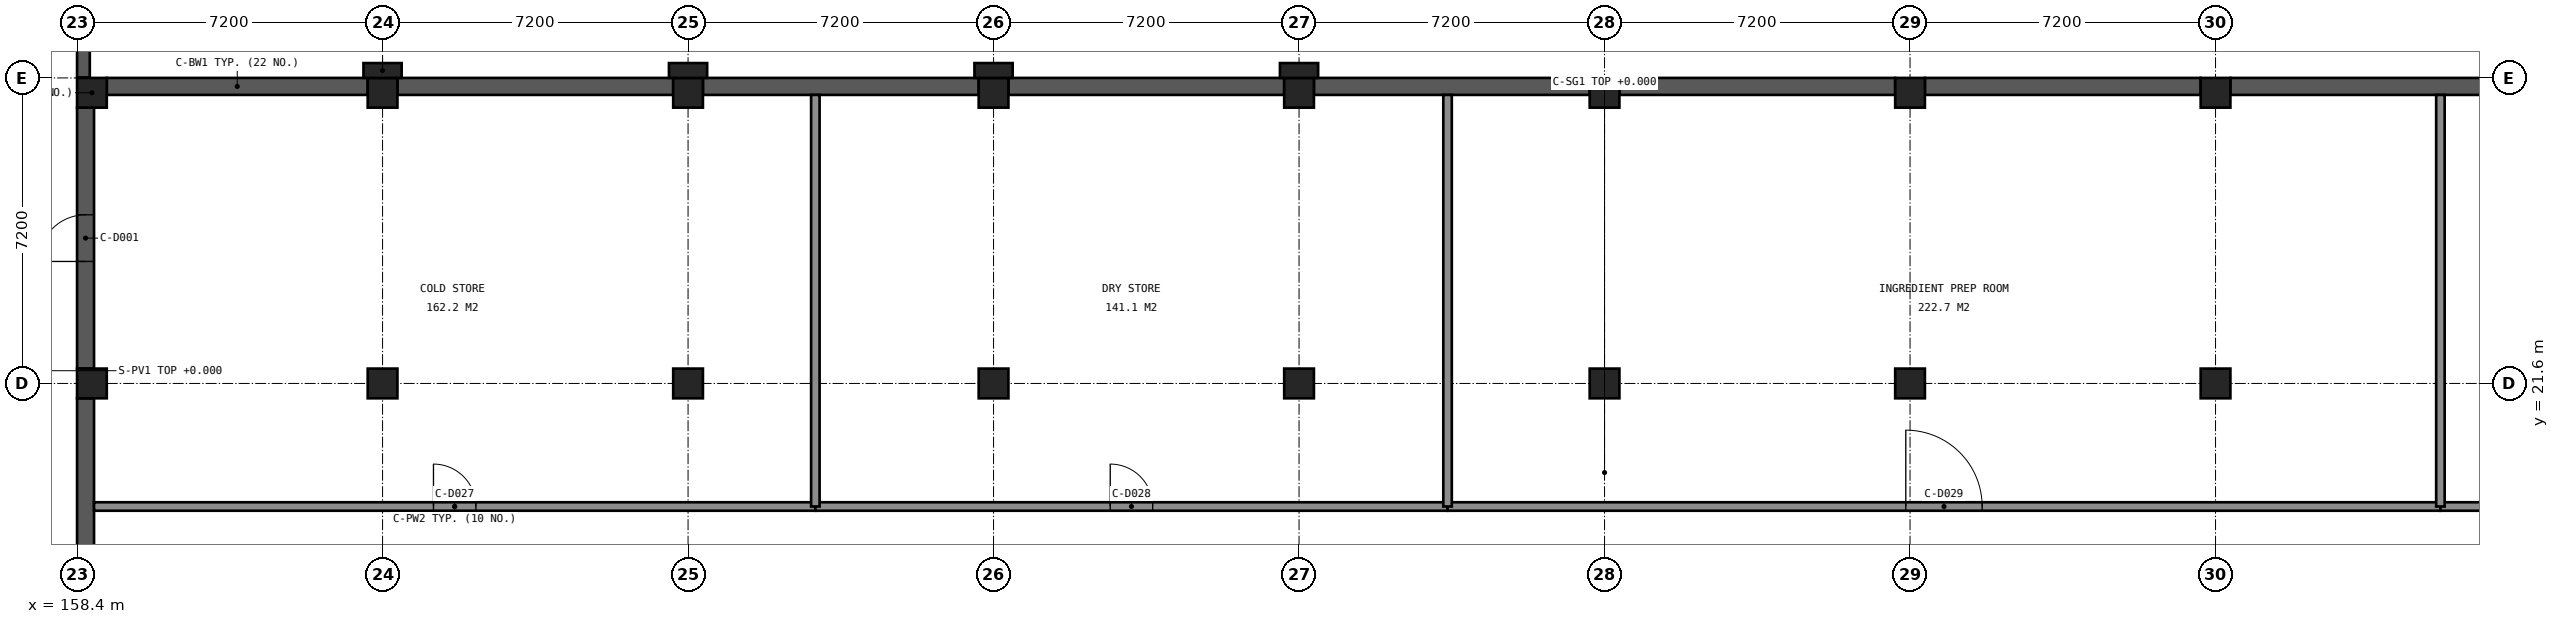
"""IFC4 building model, lengths in metres.
Left out: names, types, materials, properties, quantities, classifications, styles, units other than length and angle.
Written with IfcOpenShell. Run it as: python <this file> out.ifc"""

import sys

from ifc_helpers import new_model, si_unit, direction, frame, frame_2d, origin, origin_2d, place, context, subcontext, project, spatial, polyline, rectangle, outline, extrude, element, fill, save


model = new_model("IFC4")
c1 = context("Model", 3, precision=1e-05, world=origin(), true_north=direction((0.0, 1.0)))
c2 = subcontext(c1, "Body", "Model", "MODEL_VIEW")
j1 = project(units=[si_unit("LENGTHUNIT", "METRE"), si_unit("PLANEANGLEUNIT", "RADIAN")], contexts=[c1])
p1 = place(None, origin())
s1 = spatial("IfcSite", under=j1, at=p1, CompositionType="ELEMENT")
p2 = place(p1, origin())
s2 = spatial("IfcBuilding", under=s1, at=p2, CompositionType="ELEMENT")
p3 = place(p2, origin())
s3 = spatial("IfcBuildingStorey", under=s2, at=p3, CompositionType="ELEMENT", Elevation=0.0)
for number, where, z_axis, x_axis in (
    (1, (158.75, 28.45, -0.3), (0.0, 0.0, 1.0), (1.0, 0.0, 0.0)),
    (2, (165.6, 28.45, -0.3), (0.0, 0.0, 1.0), (1.0, 0.0, 0.0)),
    (3, (172.8, 28.45, -0.3), (0.0, 0.0, 1.0), (1.0, 0.0, 0.0)),
    (4, (180.0, 28.45, -0.3), (0.0, 0.0, 1.0), (1.0, 0.0, 0.0)),
    (5, (187.2, 28.45, -0.3), (0.0, 0.0, 1.0), (1.0, 0.0, 0.0)),
    (6, (194.4, 28.45, -0.3), (0.0, 0.0, 1.0), (1.0, 0.0, 0.0)),
    (7, (201.6, 28.45, -0.3), (0.0, 0.0, 1.0), (1.0, 0.0, 0.0)),
    (8, (208.8, 28.45, -0.3), (0.0, 0.0, 1.0), (1.0, 0.0, 0.0)),
    (9, (158.75, 21.6, -0.3), (0.0, 0.0, 1.0), (1.0, 0.0, 0.0)),
    (10, (165.6, 21.6, -0.3), (0.0, 0.0, 1.0), (1.0, 0.0, 0.0)),
    (11, (172.8, 21.6, -0.3), (0.0, 0.0, 1.0), (1.0, 0.0, 0.0)),
    (12, (180.0, 21.6, -0.3), (0.0, 0.0, 1.0), (1.0, 0.0, 0.0)),
    (13, (187.2, 21.6, -0.3), (0.0, 0.0, 1.0), (1.0, 0.0, 0.0)),
    (14, (194.4, 21.6, -0.3), (0.0, 0.0, 1.0), (1.0, 0.0, 0.0)),
    (15, (201.6, 21.6, -0.3), (0.0, 0.0, 1.0), (1.0, 0.0, 0.0)),
    (16, (208.8, 21.6, -0.3), (0.0, 0.0, 1.0), (1.0, 0.0, 0.0)),
):
    element("IfcColumn", number, at=place(p3, frame(where, z_axis=z_axis, x_axis=x_axis)), inside=s3, PredefinedType="COLUMN", context=c2, shape_type="SweptSolid", body=[
        extrude(rectangle(XDim=0.7, YDim=0.7, at=origin_2d()), origin(), (0.0, 0.0, 1.0), 5.1),
    ])
p4 = place(p3, frame((159.1, 28.6, -0.3), z_axis=(0.0, 0.0, 1.0), x_axis=(1.0, 0.0, 0.0)))
e17 = element("IfcWall", 17, at=p4, inside=s3, PredefinedType="SHEAR", context=c2, shape_type="SweptSolid", body=[
    extrude(rectangle(XDim=6.15, YDim=0.4, at=frame_2d((3.075, 0.0))), origin(), (0.0, 0.0, 1.0), 4.25),
])
for number, where, z_axis, x_axis in (
    (18, (165.95, 28.6, -0.3), (0.0, 0.0, 1.0), (1.0, 0.0, 0.0)),
    (19, (173.15, 28.6, -0.3), (0.0, 0.0, 1.0), (1.0, 0.0, 0.0)),
    (20, (180.35, 28.6, -0.3), (0.0, 0.0, 1.0), (1.0, 0.0, 0.0)),
    (21, (187.55, 28.6, -0.3), (0.0, 0.0, 1.0), (1.0, 0.0, 0.0)),
    (22, (194.75, 28.6, -0.3), (0.0, 0.0, 1.0), (1.0, 0.0, 0.0)),
    (23, (201.95, 28.6, -0.3), (0.0, 0.0, 1.0), (1.0, 0.0, 0.0)),
    (24, (209.15, 28.6, -0.3), (0.0, 0.0, 1.0), (1.0, 0.0, 0.0)),
):
    element("IfcWall", number, at=place(p3, frame(where, z_axis=z_axis, x_axis=x_axis)), inside=s3, PredefinedType="SHEAR", context=c2, shape_type="SweptSolid", body=[
        extrude(rectangle(XDim=6.5, YDim=0.4, at=frame_2d((3.25, 0.0))), origin(), (0.0, 0.0, 1.0), 4.25),
    ])
p5 = place(p3, frame((158.6, 21.95, -0.3), z_axis=(0.0, 0.0, 1.0), x_axis=(0.0, 1.0, 0.0)))
e25 = element("IfcWall", 25, at=p5, inside=s3, PredefinedType="SHEAR", context=c2, shape_type="SweptSolid", body=[
    extrude(rectangle(XDim=6.15, YDim=0.4, at=frame_2d((3.075, 0.0))), origin(), (0.0, 0.0, 1.0), 4.25),
])
p6 = place(p5, frame((2.525, 0.0, 0.3)))
e26 = element("IfcOpeningElement", 26, at=p6, cuts=e25, PredefinedType="OPENING", context=c2, shape_type="SweptSolid", body=[
    extrude(rectangle(XDim=1.1, YDim=2.1, at=frame_2d((0.55, 1.05))), frame((0.0, 0.21, 0.0), z_axis=(0.0, -1.0, 0.0), x_axis=(1.0, 0.0, 0.0)), (0.0, 0.0, 1.0), 0.42),
])
p7 = place(p3, frame((158.6, 15.2, -0.3), z_axis=(0.0, 0.0, 1.0), x_axis=(0.0, 1.0, 0.0)))
e27 = element("IfcWall", 27, at=p7, inside=s3, PredefinedType="SHEAR", context=c2, shape_type="SweptSolid", body=[
    extrude(rectangle(XDim=6.05, YDim=0.4, at=frame_2d((3.025, 0.0))), origin(), (0.0, 0.0, 1.0), 4.25),
])
p8 = place(p7, frame((1.35, 0.0, 0.3)))
e28 = element("IfcOpeningElement", 28, at=p8, cuts=e27, PredefinedType="OPENING", context=c2, shape_type="SweptSolid", body=[
    extrude(rectangle(XDim=1.1, YDim=2.1, at=frame_2d((0.55, 1.05))), frame((0.0, 0.21, 0.0), z_axis=(0.0, -1.0, 0.0), x_axis=(1.0, 0.0, 0.0)), (0.0, 0.0, 1.0), 0.42),
])
p9 = place(p3, frame((158.55, 28.81, -0.25), z_axis=(0.0, 0.0, 1.0), x_axis=(0.0, 1.0, 0.0)))
e29 = element("IfcWall", 29, at=p9, inside=s3, PredefinedType="SOLIDWALL", context=c2, shape_type="SweptSolid", body=[
    extrude(rectangle(XDim=5.632, YDim=0.3, at=frame_2d((2.816, 0.0))), origin(), (0.0, 0.0, 1.0), 2.55),
])
p10 = place(p3, frame((0.0, 0.0, 2.1)))
e30 = element("IfcWall", 30, at=p10, inside=s3, PredefinedType="SOLIDWALL", context=c2, shape_type="SweptSolid", body=[
    extrude(outline(polyline([(167.496, 28.8), (169.435, 28.8), (171.673, 29.624), (171.453, 30.182), (169.149, 29.334), (168.281, 29.046), (167.496, 28.8)])), origin(), (0.0, 0.0, 1.0), 2.6),
])
p11 = place(p3, frame((0.0, 0.0, 3.3)))
e31 = element("IfcWall", 31, at=p11, inside=s3, PredefinedType="SOLIDWALL", context=c2, shape_type="SweptSolid", body=[
    extrude(outline(polyline([(178.073, 28.8), (179.359, 28.8), (181.383, 29.948), (181.077, 30.463), (179.049, 29.314), (178.194, 28.861), (178.073, 28.8)])), origin(), (0.0, 0.0, 1.0), 2.6),
])
for number, where, z_axis, x_axis in (
    (32, (165.6, 28.975, -0.3), (0.0, 0.0, 1.0), (1.0, 0.0, 0.0)),
    (33, (172.8, 28.975, -0.3), (0.0, 0.0, 1.0), (1.0, 0.0, 0.0)),
    (34, (180.0, 28.975, -0.3), (0.0, 0.0, 1.0), (1.0, 0.0, 0.0)),
    (35, (187.2, 28.975, -0.3), (0.0, 0.0, 1.0), (1.0, 0.0, 0.0)),
):
    element("IfcColumn", number, at=place(p3, frame(where, z_axis=z_axis, x_axis=x_axis)), inside=s3, PredefinedType="PILASTER", context=c2, shape_type="SweptSolid", body=[
        extrude(rectangle(XDim=0.9, YDim=0.35, at=origin_2d()), origin(), (0.0, 0.0, 1.0), 5.1),
    ])
p12 = place(p3, frame((158.8, 18.7, 0.0), z_axis=(0.0, 0.0, 1.0), x_axis=(1.0, 0.0, 0.0)))
e36 = element("IfcWall", 36, at=p12, inside=s3, PredefinedType="PARTITIONING", context=c2, shape_type="SweptSolid", body=[
    extrude(rectangle(XDim=17.0, YDim=0.2, at=frame_2d((8.5, 0.0))), origin(), (0.0, 0.0, 1.0), 3.95),
])
p13 = place(p12, frame((8.0, 0.0, 0.0)))
e37 = element("IfcOpeningElement", 37, at=p13, cuts=e36, PredefinedType="OPENING", context=c2, shape_type="SweptSolid", body=[
    extrude(rectangle(XDim=1.0, YDim=2.1, at=frame_2d((0.5, 1.05))), frame((0.0, 0.11, 0.0), z_axis=(0.0, -1.0, 0.0), x_axis=(1.0, 0.0, 0.0)), (0.0, 0.0, 1.0), 0.22),
])
p14 = place(p3, frame((175.8, 18.7, 0.0), z_axis=(0.0, 0.0, 1.0), x_axis=(1.0, 0.0, 0.0)))
e38 = element("IfcWall", 38, at=p14, inside=s3, PredefinedType="PARTITIONING", context=c2, shape_type="SweptSolid", body=[
    extrude(rectangle(XDim=14.9, YDim=0.2, at=frame_2d((7.45, 0.0))), origin(), (0.0, 0.0, 1.0), 3.95),
])
p15 = place(p14, frame((6.95, 0.0, 0.0)))
e39 = element("IfcOpeningElement", 39, at=p15, cuts=e38, PredefinedType="OPENING", context=c2, shape_type="SweptSolid", body=[
    extrude(rectangle(XDim=1.0, YDim=2.1, at=frame_2d((0.5, 1.05))), frame((0.0, 0.11, 0.0), z_axis=(0.0, -1.0, 0.0), x_axis=(1.0, 0.0, 0.0)), (0.0, 0.0, 1.0), 0.22),
])
p16 = place(p3, frame((190.7, 18.7, 0.0), z_axis=(0.0, 0.0, 1.0), x_axis=(1.0, 0.0, 0.0)))
e40 = element("IfcWall", 40, at=p16, inside=s3, PredefinedType="PARTITIONING", context=c2, shape_type="SweptSolid", body=[
    extrude(rectangle(XDim=23.4, YDim=0.2, at=frame_2d((11.7, 0.0))), origin(), (0.0, 0.0, 1.0), 3.95),
])
p17 = place(p16, frame((10.8, 0.0, 0.0)))
e41 = element("IfcOpeningElement", 41, at=p17, cuts=e40, PredefinedType="OPENING", context=c2, shape_type="SweptSolid", body=[
    extrude(rectangle(XDim=1.8, YDim=2.1, at=frame_2d((0.9, 1.05))), frame((0.0, 0.11, 0.0), z_axis=(0.0, -1.0, 0.0), x_axis=(1.0, 0.0, 0.0)), (0.0, 0.0, 1.0), 0.22),
])
p18 = place(p3, frame((214.1, 18.7, 0.0), z_axis=(0.0, 0.0, 1.0), x_axis=(1.0, 0.0, 0.0)))
e42 = element("IfcWall", 42, at=p18, inside=s3, PredefinedType="PARTITIONING", context=c2, shape_type="SweptSolid", body=[
    extrude(rectangle(XDim=15.9, YDim=0.2, at=frame_2d((7.95, 0.0))), origin(), (0.0, 0.0, 1.0), 3.95),
])
p19 = place(p18, frame((7.45, 0.0, 0.0)))
e43 = element("IfcOpeningElement", 43, at=p19, cuts=e42, PredefinedType="OPENING", context=c2, shape_type="SweptSolid", body=[
    extrude(rectangle(XDim=1.0, YDim=2.1, at=frame_2d((0.5, 1.05))), frame((0.0, 0.11, 0.0), z_axis=(0.0, -1.0, 0.0), x_axis=(1.0, 0.0, 0.0)), (0.0, 0.0, 1.0), 0.22),
])
for number, where, z_axis, x_axis in (
    (44, (175.8, 28.4, 0.0), (0.0, 0.0, 1.0), (0.0, -1.0, 0.0)),
    (45, (190.7, 28.4, 0.0), (0.0, 0.0, 1.0), (0.0, -1.0, 0.0)),
    (46, (214.1, 28.4, 0.0), (0.0, 0.0, 1.0), (0.0, -1.0, 0.0)),
):
    element("IfcWall", number, at=place(p3, frame(where, z_axis=z_axis, x_axis=x_axis)), inside=s3, PredefinedType="PARTITIONING", context=c2, shape_type="SweptSolid", body=[
        extrude(rectangle(XDim=9.7, YDim=0.2, at=frame_2d((4.85, 0.0))), origin(), (0.0, 0.0, 1.0), 3.95),
    ])
p20 = place(p6, origin())
e47 = element("IfcDoor", 47, at=p20, inside=s3, OperationType="NOTDEFINED", PredefinedType="DOOR", context=c2, shape_type="SweptSolid", body=[
    extrude(rectangle(XDim=1.1, YDim=2.1, at=frame_2d((0.55, 1.05))), frame((0.0, 0.025, 0.0), z_axis=(0.0, -1.0, 0.0), x_axis=(1.0, 0.0, 0.0)), (0.0, 0.0, 1.0), 0.05),
])
fill(e26, e47)
p21 = place(p13, origin())
e48 = element("IfcDoor", 48, at=p21, inside=s3, OperationType="NOTDEFINED", PredefinedType="DOOR", context=c2, shape_type="SweptSolid", body=[
    extrude(rectangle(XDim=1.0, YDim=2.1, at=frame_2d((0.5, 1.05))), frame((0.0, 0.025, 0.0), z_axis=(0.0, -1.0, 0.0), x_axis=(1.0, 0.0, 0.0)), (0.0, 0.0, 1.0), 0.05),
])
fill(e37, e48)
p22 = place(p15, origin())
e49 = element("IfcDoor", 49, at=p22, inside=s3, OperationType="NOTDEFINED", PredefinedType="DOOR", context=c2, shape_type="SweptSolid", body=[
    extrude(rectangle(XDim=1.0, YDim=2.1, at=frame_2d((0.5, 1.05))), frame((0.0, 0.025, 0.0), z_axis=(0.0, -1.0, 0.0), x_axis=(1.0, 0.0, 0.0)), (0.0, 0.0, 1.0), 0.05),
])
fill(e39, e49)
p23 = place(p17, origin())
e50 = element("IfcDoor", 50, at=p23, inside=s3, OperationType="NOTDEFINED", PredefinedType="DOOR", context=c2, shape_type="SweptSolid", body=[
    extrude(rectangle(XDim=1.8, YDim=2.1, at=frame_2d((0.9, 1.05))), frame((0.0, 0.025, 0.0), z_axis=(0.0, -1.0, 0.0), x_axis=(1.0, 0.0, 0.0)), (0.0, 0.0, 1.0), 0.05),
])
fill(e41, e50)
save(model, sys.argv[1])
